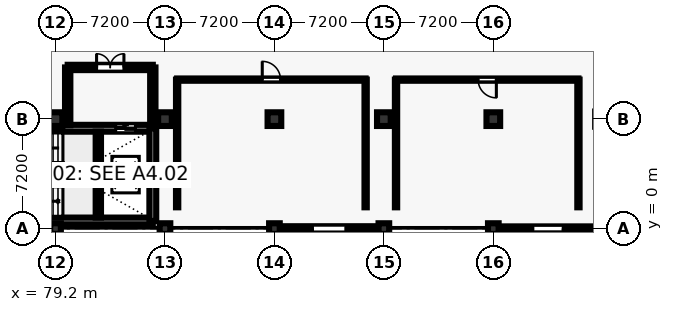
"""IFC4 building model, lengths in metres.
Left out: names, types, materials, properties, quantities, classifications, styles, units other than length and angle.
Written with IfcOpenShell. Run it as: python <this file> out.ifc"""

import sys

from ifc_helpers import new_model, si_unit, direction, frame, frame_2d, origin, origin_2d, place, context, subcontext, project, spatial, rectangle, extrude, element, fill, save


model = new_model("IFC4")
c1 = context("Model", 3, precision=1e-05, world=origin(), true_north=direction((0.0, 1.0)))
c2 = subcontext(c1, "Body", "Model", "MODEL_VIEW")
j1 = project(units=[si_unit("LENGTHUNIT", "METRE"), si_unit("PLANEANGLEUNIT", "RADIAN")], contexts=[c1])
p1 = place(None, origin())
s1 = spatial("IfcSite", under=j1, at=p1, CompositionType="ELEMENT")
p2 = place(p1, origin())
s2 = spatial("IfcBuilding", under=s1, at=p2, CompositionType="ELEMENT")
p3 = place(p2, origin())
s3 = spatial("IfcBuildingStorey", under=s2, at=p3, CompositionType="ELEMENT", Elevation=0.0)
p4 = place(p3, frame((79.2, 0.0, 0.0), z_axis=(0.0, 0.0, 1.0), x_axis=(1.0, 0.0, 0.0)))
e1 = element("IfcColumn", 1, at=p4, inside=s3, PredefinedType="COLUMN", context=c2, shape_type="SweptSolid", body=[
    extrude(rectangle(XDim=0.7, YDim=0.7, at=origin_2d()), origin(), (0.0, 0.0, 1.0), 5.4),
])
p5 = place(p3, frame((79.2, 7.2, 0.0), z_axis=(0.0, 0.0, 1.0), x_axis=(1.0, 0.0, 0.0)))
e2 = element("IfcColumn", 2, at=p5, inside=s3, PredefinedType="COLUMN", context=c2, shape_type="SweptSolid", body=[
    extrude(rectangle(XDim=0.9, YDim=0.9, at=origin_2d()), origin(), (0.0, 0.0, 1.0), 5.4),
])
p6 = place(p3, frame((86.4, 0.0, 0.0), z_axis=(0.0, 0.0, 1.0), x_axis=(1.0, 0.0, 0.0)))
e3 = element("IfcColumn", 3, at=p6, inside=s3, PredefinedType="COLUMN", context=c2, shape_type="SweptSolid", body=[
    extrude(rectangle(XDim=0.7, YDim=0.7, at=origin_2d()), origin(), (0.0, 0.0, 1.0), 5.4),
])
p7 = place(p3, frame((86.4, 7.2, 0.0), z_axis=(0.0, 0.0, 1.0), x_axis=(1.0, 0.0, 0.0)))
e4 = element("IfcColumn", 4, at=p7, inside=s3, PredefinedType="COLUMN", context=c2, shape_type="SweptSolid", body=[
    extrude(rectangle(XDim=0.9, YDim=0.9, at=origin_2d()), origin(), (0.0, 0.0, 1.0), 5.4),
])
p8 = place(p3, frame((93.6, 0.0, 0.0), z_axis=(0.0, 0.0, 1.0), x_axis=(1.0, 0.0, 0.0)))
e5 = element("IfcColumn", 5, at=p8, inside=s3, PredefinedType="COLUMN", context=c2, shape_type="SweptSolid", body=[
    extrude(rectangle(XDim=0.7, YDim=0.7, at=origin_2d()), origin(), (0.0, 0.0, 1.0), 5.4),
])
p9 = place(p3, frame((93.6, 7.2, 0.0), z_axis=(0.0, 0.0, 1.0), x_axis=(1.0, 0.0, 0.0)))
e6 = element("IfcColumn", 6, at=p9, inside=s3, PredefinedType="COLUMN", context=c2, shape_type="SweptSolid", body=[
    extrude(rectangle(XDim=0.9, YDim=0.9, at=origin_2d()), origin(), (0.0, 0.0, 1.0), 5.4),
])
p10 = place(p3, frame((100.8, 0.0, 0.0), z_axis=(0.0, 0.0, 1.0), x_axis=(1.0, 0.0, 0.0)))
e7 = element("IfcColumn", 7, at=p10, inside=s3, PredefinedType="COLUMN", context=c2, shape_type="SweptSolid", body=[
    extrude(rectangle(XDim=0.7, YDim=0.7, at=origin_2d()), origin(), (0.0, 0.0, 1.0), 5.4),
])
p11 = place(p3, frame((100.8, 7.2, 0.0), z_axis=(0.0, 0.0, 1.0), x_axis=(1.0, 0.0, 0.0)))
e8 = element("IfcColumn", 8, at=p11, inside=s3, PredefinedType="COLUMN", context=c2, shape_type="SweptSolid", body=[
    extrude(rectangle(XDim=0.9, YDim=0.9, at=origin_2d()), origin(), (0.0, 0.0, 1.0), 5.4),
])
p12 = place(p3, frame((108.0, 0.0, 0.0), z_axis=(0.0, 0.0, 1.0), x_axis=(1.0, 0.0, 0.0)))
e9 = element("IfcColumn", 9, at=p12, inside=s3, PredefinedType="COLUMN", context=c2, shape_type="SweptSolid", body=[
    extrude(rectangle(XDim=0.7, YDim=0.7, at=origin_2d()), origin(), (0.0, 0.0, 1.0), 5.4),
])
p13 = place(p3, frame((108.0, 7.2, 0.0), z_axis=(0.0, 0.0, 1.0), x_axis=(1.0, 0.0, 0.0)))
e10 = element("IfcColumn", 10, at=p13, inside=s3, PredefinedType="COLUMN", context=c2, shape_type="SweptSolid", body=[
    extrude(rectangle(XDim=0.9, YDim=0.9, at=origin_2d()), origin(), (0.0, 0.0, 1.0), 5.4),
])
p14 = place(p3, frame((72.8, 0.5, 0.0), z_axis=(0.0, 0.0, 1.0), x_axis=(1.0, 0.0, 0.0)))
e11 = element("IfcWall", 11, at=p14, inside=s3, PredefinedType="SHEAR", context=c2, shape_type="SweptSolid", body=[
    extrude(rectangle(XDim=12.8, YDim=0.45, at=frame_2d((6.4, 0.0))), origin(), (0.0, 0.0, 1.0), 5.06),
])
p15 = place(p14, frame((0.55, 0.0, 0.0)))
e12 = element("IfcOpeningElement", 12, at=p15, cuts=e11, PredefinedType="OPENING", context=c2, shape_type="SweptSolid", body=[
    extrude(rectangle(XDim=1.5, YDim=2.25, at=frame_2d((0.75, 1.125))), frame((0.0, 0.235, 0.0), z_axis=(0.0, -1.0, 0.0), x_axis=(1.0, 0.0, 0.0)), (0.0, 0.0, 1.0), 0.47),
])
p16 = place(p3, frame((72.8, 6.6, 0.0), z_axis=(0.0, 0.0, 1.0), x_axis=(1.0, 0.0, 0.0)))
e13 = element("IfcWall", 13, at=p16, inside=s3, PredefinedType="SHEAR", context=c2, shape_type="SweptSolid", body=[
    extrude(rectangle(XDim=12.8, YDim=0.45, at=frame_2d((6.4, 0.0))), origin(), (0.0, 0.0, 1.0), 5.06),
])
p17 = place(p16, frame((0.55, 0.0, 0.0)))
e14 = element("IfcOpeningElement", 14, at=p17, cuts=e13, PredefinedType="OPENING", context=c2, shape_type="SweptSolid", body=[
    extrude(rectangle(XDim=1.2, YDim=2.25, at=frame_2d((0.6, 1.125))), frame((0.0, 0.235, 0.0), z_axis=(0.0, -1.0, 0.0), x_axis=(1.0, 0.0, 0.0)), (0.0, 0.0, 1.0), 0.47),
])
p18 = place(p16, frame((10.358, 0.0, 0.0)))
e15 = element("IfcOpeningElement", 15, at=p18, cuts=e13, PredefinedType="OPENING", context=c2, shape_type="SweptSolid", body=[
    extrude(rectangle(XDim=1.3, YDim=2.25, at=frame_2d((0.65, 1.125))), frame((0.0, 0.235, 0.0), z_axis=(0.0, -1.0, 0.0), x_axis=(1.0, 0.0, 0.0)), (0.0, 0.0, 1.0), 0.47),
])
p19 = place(p3, frame((85.6, 0.5, 0.0), z_axis=(0.0, 0.0, 1.0), x_axis=(0.0, 1.0, 0.0)))
e16 = element("IfcWall", 16, at=p19, inside=s3, PredefinedType="SHEAR", context=c2, shape_type="SweptSolid", body=[
    extrude(rectangle(XDim=6.1, YDim=0.45, at=frame_2d((3.05, 0.0))), origin(), (0.0, 0.0, 1.0), 5.06),
])
p20 = place(p3, frame((82.016, 0.725, 0.0), z_axis=(0.0, 0.0, 1.0), x_axis=(0.0, 1.0, 0.0)))
e17 = element("IfcWall", 17, at=p20, inside=s3, PredefinedType="SHEAR", context=c2, shape_type="SweptSolid", body=[
    extrude(rectangle(XDim=5.65, YDim=0.35, at=frame_2d((2.825, 0.0))), origin(), (0.0, 0.0, 1.0), 5.06),
])
p21 = place(p3, frame((93.95, 0.0, 0.0), z_axis=(0.0, 0.0, 1.0), x_axis=(1.0, 0.0, 0.0)))
e18 = element("IfcWall", 18, at=p21, inside=s3, PredefinedType="SOLIDWALL", context=c2, shape_type="SweptSolid", body=[
    extrude(rectangle(XDim=6.5, YDim=0.31, at=frame_2d((3.25, 0.0))), origin(), (0.0, 0.0, 1.0), 4.1),
])
p22 = place(p21, frame((2.15, 0.0, 0.0)))
e19 = element("IfcOpeningElement", 19, at=p22, cuts=e18, PredefinedType="OPENING", context=c2, shape_type="SweptSolid", body=[
    extrude(rectangle(XDim=2.2, YDim=2.5, at=frame_2d((1.1, 1.25))), frame((0.0, 0.165, 0.0), z_axis=(0.0, -1.0, 0.0), x_axis=(1.0, 0.0, 0.0)), (0.0, 0.0, 1.0), 0.33),
])
p23 = place(p3, frame((108.35, 0.0, 0.0), z_axis=(0.0, 0.0, 1.0), x_axis=(1.0, 0.0, 0.0)))
e20 = element("IfcWall", 20, at=p23, inside=s3, PredefinedType="SOLIDWALL", context=c2, shape_type="SweptSolid", body=[
    extrude(rectangle(XDim=6.5, YDim=0.29, at=frame_2d((3.25, 0.0))), origin(), (0.0, 0.0, 1.0), 4.1),
])
p24 = place(p23, frame((2.25, 0.0, 0.0)))
e21 = element("IfcOpeningElement", 21, at=p24, cuts=e20, PredefinedType="OPENING", context=c2, shape_type="SweptSolid", body=[
    extrude(rectangle(XDim=2.0, YDim=2.45, at=frame_2d((1.0, 1.225))), frame((0.0, 0.155, 0.0), z_axis=(0.0, -1.0, 0.0), x_axis=(1.0, 0.0, 0.0)), (0.0, 0.0, 1.0), 0.31),
])
p25 = place(p3, frame((85.6, 6.8, 0.0), z_axis=(0.0, 0.0, 1.0), x_axis=(0.0, 1.0, 0.0)))
e22 = element("IfcWall", 22, at=p25, inside=s3, PredefinedType="SHEAR", context=c2, shape_type="SweptSolid", body=[
    extrude(rectangle(XDim=3.8, YDim=0.35, at=frame_2d((1.9, 0.0))), origin(), (0.0, 0.0, 1.0), 4.1),
])
p26 = place(p3, frame((85.6, 10.6, 0.0), z_axis=(0.0, 0.0, 1.0), x_axis=(-1.0, 0.0, 0.0)))
e23 = element("IfcWall", 23, at=p26, inside=s3, PredefinedType="SHEAR", context=c2, shape_type="SweptSolid", body=[
    extrude(rectangle(XDim=5.6, YDim=0.35, at=frame_2d((2.8, 0.0))), origin(), (0.0, 0.0, 1.0), 4.1),
])
p27 = place(p26, frame((1.9, 0.0, 0.0)))
e24 = element("IfcOpeningElement", 24, at=p27, cuts=e23, PredefinedType="OPENING", context=c2, shape_type="SweptSolid", body=[
    extrude(rectangle(XDim=1.8, YDim=2.3, at=frame_2d((0.9, 1.15))), frame((0.0, 0.185, 0.0), z_axis=(0.0, -1.0, 0.0), x_axis=(1.0, 0.0, 0.0)), (0.0, 0.0, 1.0), 0.37),
])
p28 = place(p3, frame((80.0, 10.6, 0.0), z_axis=(0.0, 0.0, 1.0), x_axis=(0.0, -1.0, 0.0)))
e25 = element("IfcWall", 25, at=p28, inside=s3, PredefinedType="SHEAR", context=c2, shape_type="SweptSolid", body=[
    extrude(rectangle(XDim=3.8, YDim=0.35, at=frame_2d((1.9, 0.0))), origin(), (0.0, 0.0, 1.0), 4.1),
])
p29 = place(p3, frame((99.6, 1.4, 0.0), z_axis=(0.0, 0.0, 1.0), x_axis=(0.0, 1.0, 0.0)))
e26 = element("IfcWall", 26, at=p29, inside=s3, PredefinedType="PARTITIONING", context=c2, shape_type="SweptSolid", body=[
    extrude(rectangle(XDim=8.4, YDim=0.15, at=frame_2d((4.2, 0.0))), origin(), (0.0, 0.0, 1.0), 4.1),
])
p30 = place(p3, frame((99.6, 9.8, 0.0), z_axis=(0.0, 0.0, 1.0), x_axis=(-1.0, 0.0, 0.0)))
e27 = element("IfcWall", 27, at=p30, inside=s3, PredefinedType="PARTITIONING", context=c2, shape_type="SweptSolid", body=[
    extrude(rectangle(XDim=12.4, YDim=0.15, at=frame_2d((6.2, 0.0))), origin(), (0.0, 0.0, 1.0), 4.1),
])
p31 = place(p30, frame((5.6, 0.0, 0.0)))
e28 = element("IfcOpeningElement", 28, at=p31, cuts=e27, PredefinedType="OPENING", context=c2, shape_type="SweptSolid", body=[
    extrude(rectangle(XDim=1.2, YDim=2.2, at=frame_2d((0.6, 1.1))), frame((0.0, 0.085, 0.0), z_axis=(0.0, -1.0, 0.0), x_axis=(1.0, 0.0, 0.0)), (0.0, 0.0, 1.0), 0.17),
])
for number, where, z_axis, x_axis in (
    (29, (87.2, 9.8, 0.0), (0.0, 0.0, 1.0), (0.0, -1.0, 0.0)),
    (30, (113.6, 1.4, 0.0), (0.0, 0.0, 1.0), (0.0, 1.0, 0.0)),
):
    element("IfcWall", number, at=place(p3, frame(where, z_axis=z_axis, x_axis=x_axis)), inside=s3, PredefinedType="PARTITIONING", context=c2, shape_type="SweptSolid", body=[
        extrude(rectangle(XDim=8.4, YDim=0.15, at=frame_2d((4.2, 0.0))), origin(), (0.0, 0.0, 1.0), 4.1),
    ])
p32 = place(p3, frame((113.6, 9.8, 0.0), z_axis=(0.0, 0.0, 1.0), x_axis=(-1.0, 0.0, 0.0)))
e31 = element("IfcWall", 31, at=p32, inside=s3, PredefinedType="PARTITIONING", context=c2, shape_type="SweptSolid", body=[
    extrude(rectangle(XDim=12.0, YDim=0.15, at=frame_2d((6.0, 0.0))), origin(), (0.0, 0.0, 1.0), 4.1),
])
p33 = place(p32, frame((5.4, 0.0, 0.0)))
e32 = element("IfcOpeningElement", 32, at=p33, cuts=e31, PredefinedType="OPENING", context=c2, shape_type="SweptSolid", body=[
    extrude(rectangle(XDim=1.2, YDim=2.2, at=frame_2d((0.6, 1.1))), frame((0.0, 0.085, 0.0), z_axis=(0.0, -1.0, 0.0), x_axis=(1.0, 0.0, 0.0)), (0.0, 0.0, 1.0), 0.17),
])
p34 = place(p3, frame((101.6, 9.8, 0.0), z_axis=(0.0, 0.0, 1.0), x_axis=(0.0, -1.0, 0.0)))
e33 = element("IfcWall", 33, at=p34, inside=s3, PredefinedType="PARTITIONING", context=c2, shape_type="SweptSolid", body=[
    extrude(rectangle(XDim=8.4, YDim=0.15, at=frame_2d((4.2, 0.0))), origin(), (0.0, 0.0, 1.0), 4.1),
])
p35 = place(p22, frame((2.2, 0.0, 0.0), z_axis=(0.0, 0.0, 1.0), x_axis=(-1.0, 0.0, 0.0)))
e34 = element("IfcDoor", 34, at=p35, inside=s3, OperationType="SINGLE_SWING_LEFT", PredefinedType="DOOR", context=c2, shape_type="SweptSolid", body=[
    extrude(rectangle(XDim=2.2, YDim=2.5, at=frame_2d((1.1, 1.25))), frame((0.0, 0.025, 0.0), z_axis=(0.0, -1.0, 0.0), x_axis=(1.0, 0.0, 0.0)), (0.0, 0.0, 1.0), 0.05),
])
fill(e19, e34)
p36 = place(p24, frame((2.0, 0.0, 0.0), z_axis=(0.0, 0.0, 1.0), x_axis=(-1.0, 0.0, 0.0)))
e35 = element("IfcDoor", 35, at=p36, inside=s3, OperationType="SINGLE_SWING_RIGHT", PredefinedType="DOOR", context=c2, shape_type="SweptSolid", body=[
    extrude(rectangle(XDim=2.0, YDim=2.45, at=frame_2d((1.0, 1.225))), frame((0.0, 0.025, 0.0), z_axis=(0.0, -1.0, 0.0), x_axis=(1.0, 0.0, 0.0)), (0.0, 0.0, 1.0), 0.05),
])
fill(e21, e35)
p37 = place(p18, origin())
e36 = element("IfcDoor", 36, at=p37, inside=s3, OperationType="SLIDING_TO_RIGHT", PredefinedType="DOOR", context=c2, shape_type="SweptSolid", body=[
    extrude(rectangle(XDim=1.3, YDim=2.25, at=frame_2d((0.65, 1.125))), frame((0.0, 0.025, 0.0), z_axis=(0.0, -1.0, 0.0), x_axis=(1.0, 0.0, 0.0)), (0.0, 0.0, 1.0), 0.05),
])
fill(e15, e36)
p38 = place(p27, frame((1.8, 0.0, 0.0), z_axis=(0.0, 0.0, 1.0), x_axis=(-1.0, 0.0, 0.0)))
e37 = element("IfcDoor", 37, at=p38, inside=s3, OperationType="DOUBLE_DOOR_SINGLE_SWING", PredefinedType="DOOR", context=c2, shape_type="SweptSolid", body=[
    extrude(rectangle(XDim=1.8, YDim=2.3, at=frame_2d((0.9, 1.15))), frame((0.0, 0.025, 0.0), z_axis=(0.0, -1.0, 0.0), x_axis=(1.0, 0.0, 0.0)), (0.0, 0.0, 1.0), 0.05),
])
fill(e24, e37)
p39 = place(p31, frame((1.2, 0.0, 0.0), z_axis=(0.0, 0.0, 1.0), x_axis=(-1.0, 0.0, 0.0)))
e38 = element("IfcDoor", 38, at=p39, inside=s3, OperationType="SINGLE_SWING_RIGHT", PredefinedType="DOOR", context=c2, shape_type="SweptSolid", body=[
    extrude(rectangle(XDim=1.2, YDim=2.2, at=frame_2d((0.6, 1.1))), frame((0.0, 0.025, 0.0), z_axis=(0.0, -1.0, 0.0), x_axis=(1.0, 0.0, 0.0)), (0.0, 0.0, 1.0), 0.05),
])
fill(e28, e38)
p40 = place(p33, origin())
e39 = element("IfcDoor", 39, at=p40, inside=s3, OperationType="SINGLE_SWING_LEFT", PredefinedType="DOOR", context=c2, shape_type="SweptSolid", body=[
    extrude(rectangle(XDim=1.2, YDim=2.2, at=frame_2d((0.6, 1.1))), frame((0.0, 0.025, 0.0), z_axis=(0.0, -1.0, 0.0), x_axis=(1.0, 0.0, 0.0)), (0.0, 0.0, 1.0), 0.05),
])
fill(e32, e39)
save(model, sys.argv[1])
